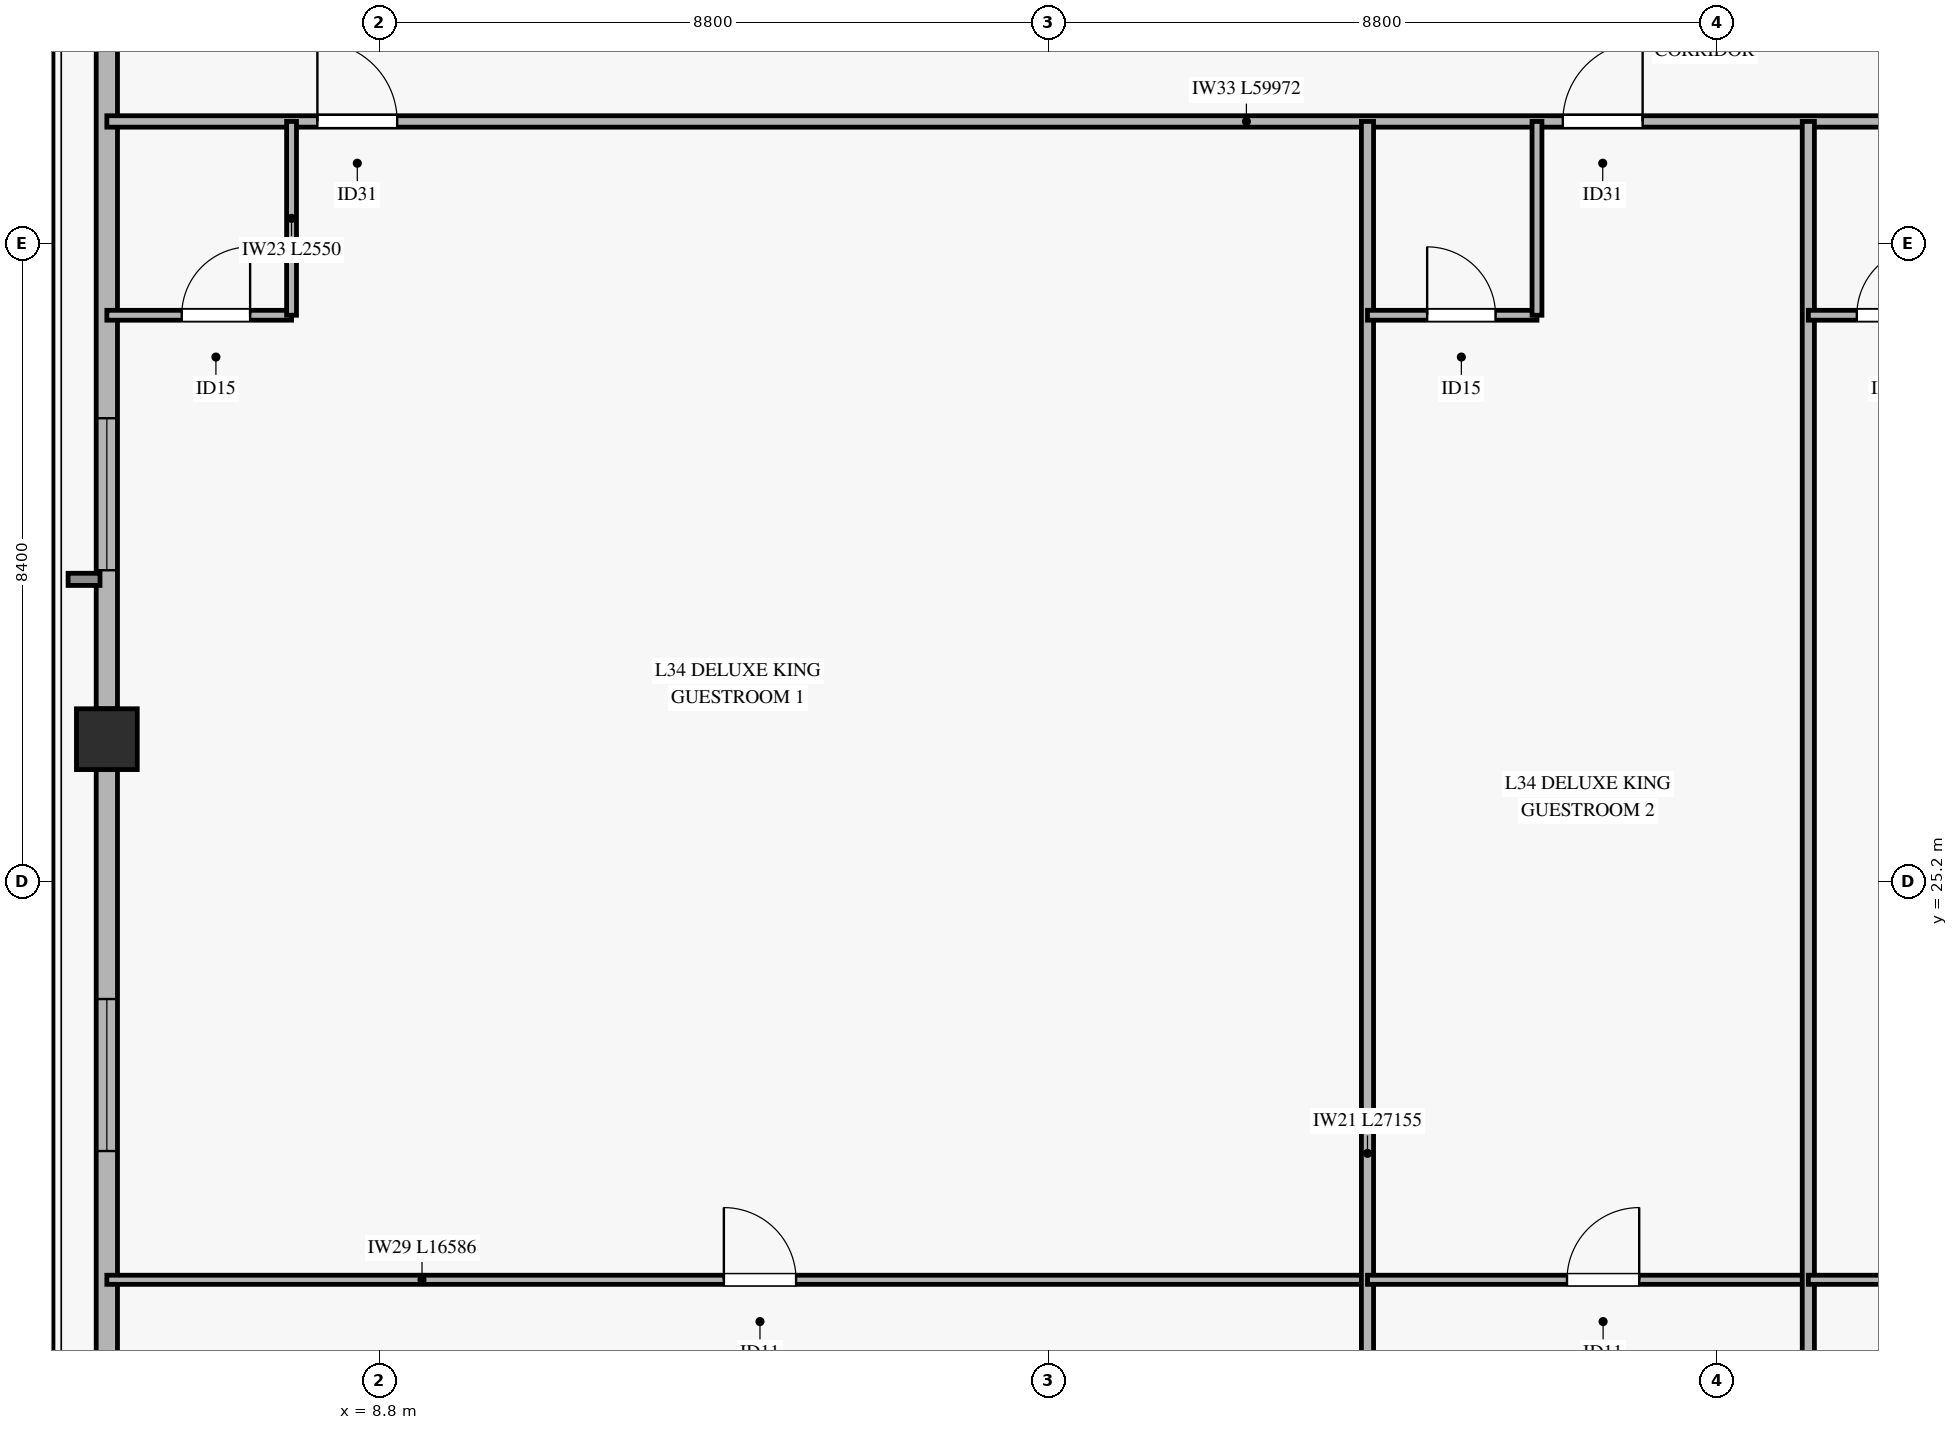
"""IFC4 building model, lengths in metres.
Left out: names, types, materials, properties, quantities, classifications, styles, units other than length and angle.
Written with IfcOpenShell. Run it as: python <this file> out.ifc"""

import sys

from ifc_helpers import new_model, si_unit, direction, frame, frame_2d, origin, origin_2d, place, context, subcontext, project, spatial, rectangle, hollow_rectangle, extrude, source, transform, mapped, element, fill, save


model = new_model("IFC4")
c1 = context("Model", 3, precision=1e-05, world=origin(), true_north=direction((0.0, 1.0)))
c2 = subcontext(c1, "Body", "Model", "MODEL_VIEW")
j1 = project(units=[si_unit("LENGTHUNIT", "METRE"), si_unit("PLANEANGLEUNIT", "RADIAN")], contexts=[c1])
p1 = place(None, origin())
s1 = spatial("IfcSite", under=j1, at=p1, CompositionType="ELEMENT")
p2 = place(p1, origin())
s2 = spatial("IfcBuilding", under=s1, at=p2, CompositionType="ELEMENT")
p3 = place(p2, frame((0.0, 0.0, 141.2)))
s3 = spatial("IfcBuildingStorey", under=s2, at=p3, CompositionType="ELEMENT", Elevation=141.2)
m1 = source(origin(), c2, "Body", "SweptSolid", [
    extrude(hollow_rectangle(XDim=0.8, YDim=0.8, WallThickness=0.036, at=origin_2d()), origin(), (0.0, 0.0, 1.0), 3.22),
])
p4 = place(p3, frame((5.214, 27.072, 0.0), z_axis=(0.0, 0.0, 1.0), x_axis=(1.0, 0.0, 0.0)))
e1 = element("IfcColumn", 1, at=p4, inside=s3, PredefinedType="COLUMN", context=c2, shape_type="MappedRepresentation", body=[
    mapped(m1, transform((0.0, 0.0, 0.0), x_axis=(1.0, 0.0, 0.0), y_axis=(0.0, 1.0, 0.0), z_axis=(0.0, 0.0, 1.0), scale=1.0)),
])
p5 = place(p3, frame((5.214, 11.01, 0.0), z_axis=(0.0, 0.0, 1.0), x_axis=(0.0, 1.0, 0.0)))
e2 = element("IfcWall", 2, at=p5, inside=s3, PredefinedType="SOLIDWALL", context=c2, shape_type="SweptSolid", body=[
    extrude(rectangle(XDim=15.662, YDim=0.28, at=frame_2d((7.831, 0.0))), origin(), (0.0, 0.0, 1.0), 2.7),
])
p6 = place(p5, frame((3.312, 0.0, 0.45)))
e3 = element("IfcOpeningElement", 3, at=p6, cuts=e2, PredefinedType="OPENING", context=c2, shape_type="SweptSolid", body=[
    extrude(rectangle(XDim=2.0, YDim=2.0, at=frame_2d((1.0, 1.0))), frame((0.0, 0.15, 0.0), z_axis=(0.0, -1.0, 0.0), x_axis=(1.0, 0.0, 0.0)), (0.0, 0.0, 1.0), 0.3),
])
p7 = place(p5, frame((10.643, 0.0, 0.45)))
e4 = element("IfcOpeningElement", 4, at=p7, cuts=e2, PredefinedType="OPENING", context=c2, shape_type="SweptSolid", body=[
    extrude(rectangle(XDim=2.0, YDim=2.0, at=frame_2d((1.0, 1.0))), frame((0.0, 0.15, 0.0), z_axis=(0.0, -1.0, 0.0), x_axis=(1.0, 0.0, 0.0)), (0.0, 0.0, 1.0), 0.3),
])
p8 = place(p3, frame((5.214, 27.472, 0.0), z_axis=(0.0, 0.0, 1.0), x_axis=(0.0, 1.0, 0.0)))
e5 = element("IfcWall", 5, at=p8, inside=s3, PredefinedType="SOLIDWALL", context=c2, shape_type="SweptSolid", body=[
    extrude(rectangle(XDim=15.662, YDim=0.28, at=frame_2d((7.831, 0.0))), origin(), (0.0, 0.0, 1.0), 2.7),
])
p9 = place(p8, frame((1.823, 0.0, 0.45)))
e6 = element("IfcOpeningElement", 6, at=p9, cuts=e5, PredefinedType="OPENING", context=c2, shape_type="SweptSolid", body=[
    extrude(rectangle(XDim=2.0, YDim=2.0, at=frame_2d((1.0, 1.0))), frame((0.0, 0.15, 0.0), z_axis=(0.0, -1.0, 0.0), x_axis=(1.0, 0.0, 0.0)), (0.0, 0.0, 1.0), 0.3),
])
p10 = place(p8, frame((12.458, 0.0, 0.45)))
e7 = element("IfcOpeningElement", 7, at=p10, cuts=e5, PredefinedType="OPENING", context=c2, shape_type="SweptSolid", body=[
    extrude(rectangle(XDim=2.0, YDim=2.0, at=frame_2d((1.0, 1.0))), frame((0.0, 0.15, 0.0), z_axis=(0.0, -1.0, 0.0), x_axis=(1.0, 0.0, 0.0)), (0.0, 0.0, 1.0), 0.3),
])
p11 = place(p3, frame((5.214, 35.2, 0.0), z_axis=(0.0, 0.0, 1.0), x_axis=(1.0, 0.0, 0.0)))
e8 = element("IfcWall", 8, at=p11, inside=s3, PredefinedType="PARTITIONING", context=c2, shape_type="SweptSolid", body=[
    extrude(rectangle(XDim=59.972, YDim=0.15, at=frame_2d((29.986, 0.0))), origin(), (0.0, 0.0, 1.0), 2.405),
])
p12 = place(p11, frame((2.77, 0.0, 0.0)))
e9 = element("IfcOpeningElement", 9, at=p12, cuts=e8, PredefinedType="OPENING", context=c2, shape_type="SweptSolid", body=[
    extrude(rectangle(XDim=1.05, YDim=2.15, at=frame_2d((0.525, 1.075))), frame((0.0, 0.085, 0.0), z_axis=(0.0, -1.0, 0.0), x_axis=(1.0, 0.0, 0.0)), (0.0, 0.0, 1.0), 0.17),
])
p13 = place(p11, frame((19.156, 0.0, 0.0)))
e10 = element("IfcOpeningElement", 10, at=p13, cuts=e8, PredefinedType="OPENING", context=c2, shape_type="SweptSolid", body=[
    extrude(rectangle(XDim=1.05, YDim=2.15, at=frame_2d((0.525, 1.075))), frame((0.0, 0.085, 0.0), z_axis=(0.0, -1.0, 0.0), x_axis=(1.0, 0.0, 0.0)), (0.0, 0.0, 1.0), 0.17),
])
p14 = place(p11, frame((24.662, 0.0, 0.0)))
e11 = element("IfcOpeningElement", 11, at=p14, cuts=e8, PredefinedType="OPENING", context=c2, shape_type="SweptSolid", body=[
    extrude(rectangle(XDim=1.05, YDim=2.15, at=frame_2d((0.525, 1.075))), frame((0.0, 0.085, 0.0), z_axis=(0.0, -1.0, 0.0), x_axis=(1.0, 0.0, 0.0)), (0.0, 0.0, 1.0), 0.17),
])
p15 = place(p11, frame((29.462, 0.0, 0.0)))
e12 = element("IfcOpeningElement", 12, at=p15, cuts=e8, PredefinedType="OPENING", context=c2, shape_type="SweptSolid", body=[
    extrude(rectangle(XDim=1.05, YDim=2.15, at=frame_2d((0.525, 1.075))), frame((0.0, 0.085, 0.0), z_axis=(0.0, -1.0, 0.0), x_axis=(1.0, 0.0, 0.0)), (0.0, 0.0, 1.0), 0.17),
])
p16 = place(p11, frame((34.262, 0.0, 0.0)))
e13 = element("IfcOpeningElement", 13, at=p16, cuts=e8, PredefinedType="OPENING", context=c2, shape_type="SweptSolid", body=[
    extrude(rectangle(XDim=1.05, YDim=2.15, at=frame_2d((0.525, 1.075))), frame((0.0, 0.085, 0.0), z_axis=(0.0, -1.0, 0.0), x_axis=(1.0, 0.0, 0.0)), (0.0, 0.0, 1.0), 0.17),
])
p17 = place(p11, frame((38.806, 0.0, 0.0)))
e14 = element("IfcOpeningElement", 14, at=p17, cuts=e8, PredefinedType="OPENING", context=c2, shape_type="SweptSolid", body=[
    extrude(rectangle(XDim=1.05, YDim=2.15, at=frame_2d((0.525, 1.075))), frame((0.0, 0.085, 0.0), z_axis=(0.0, -1.0, 0.0), x_axis=(1.0, 0.0, 0.0)), (0.0, 0.0, 1.0), 0.17),
])
p18 = place(p11, frame((42.956, 0.0, 0.0)))
e15 = element("IfcOpeningElement", 15, at=p18, cuts=e8, PredefinedType="OPENING", context=c2, shape_type="SweptSolid", body=[
    extrude(rectangle(XDim=1.05, YDim=2.15, at=frame_2d((0.525, 1.075))), frame((0.0, 0.085, 0.0), z_axis=(0.0, -1.0, 0.0), x_axis=(1.0, 0.0, 0.0)), (0.0, 0.0, 1.0), 0.17),
])
p19 = place(p3, frame((5.214, 32.65, 0.0), z_axis=(0.0, 0.0, 1.0), x_axis=(1.0, 0.0, 0.0)))
e16 = element("IfcWall", 16, at=p19, inside=s3, PredefinedType="PARTITIONING", context=c2, shape_type="SweptSolid", body=[
    extrude(rectangle(XDim=2.43, YDim=0.13, at=frame_2d((1.215, 0.0))), origin(), (0.0, 0.0, 1.0), 2.705),
])
p20 = place(p19, frame((0.985, 0.0, 0.0)))
e17 = element("IfcOpeningElement", 17, at=p20, cuts=e16, PredefinedType="OPENING", context=c2, shape_type="SweptSolid", body=[
    extrude(rectangle(XDim=0.9, YDim=2.1, at=frame_2d((0.45, 1.05))), frame((0.0, 0.075, 0.0), z_axis=(0.0, -1.0, 0.0), x_axis=(1.0, 0.0, 0.0)), (0.0, 0.0, 1.0), 0.15),
])
p21 = place(p3, frame((7.644, 32.65, 0.0), z_axis=(0.0, 0.0, 1.0), x_axis=(0.0, 1.0, 0.0)))
e18 = element("IfcWall", 18, at=p21, inside=s3, PredefinedType="PARTITIONING", context=c2, shape_type="SweptSolid", body=[
    extrude(rectangle(XDim=2.55, YDim=0.13, at=frame_2d((1.275, 0.0))), origin(), (0.0, 0.0, 1.0), 3.22),
])
p22 = place(p3, frame((5.214, 19.959, 0.0), z_axis=(0.0, 0.0, 1.0), x_axis=(1.0, 0.0, 0.0)))
e19 = element("IfcWall", 19, at=p22, inside=s3, PredefinedType="PARTITIONING", context=c2, shape_type="SweptSolid", body=[
    extrude(rectangle(XDim=16.586, YDim=0.12, at=frame_2d((8.293, 0.0))), origin(), (0.0, 0.0, 1.0), 2.405),
])
p23 = place(p22, frame((8.118, 0.0, 0.0)))
e20 = element("IfcOpeningElement", 20, at=p23, cuts=e19, PredefinedType="OPENING", context=c2, shape_type="SweptSolid", body=[
    extrude(rectangle(XDim=0.95, YDim=2.1, at=frame_2d((0.475, 1.05))), frame((0.0, 0.07, 0.0), z_axis=(0.0, -1.0, 0.0), x_axis=(1.0, 0.0, 0.0)), (0.0, 0.0, 1.0), 0.14),
])
p24 = place(p3, frame((21.8, 8.045, 0.0), z_axis=(0.0, 0.0, 1.0), x_axis=(0.0, 1.0, 0.0)))
e21 = element("IfcWall", 21, at=p24, inside=s3, PredefinedType="PARTITIONING", context=c2, shape_type="SweptSolid", body=[
    extrude(rectangle(XDim=27.155, YDim=0.16, at=frame_2d((13.578, 0.0))), origin(), (0.0, 0.0, 1.0), 2.705),
])
p25 = place(p3, frame((21.8, 32.65, 0.0), z_axis=(0.0, 0.0, 1.0), x_axis=(1.0, 0.0, 0.0)))
e22 = element("IfcWall", 22, at=p25, inside=s3, PredefinedType="PARTITIONING", context=c2, shape_type="SweptSolid", body=[
    extrude(rectangle(XDim=2.23, YDim=0.13, at=frame_2d((1.115, 0.0))), origin(), (0.0, 0.0, 1.0), 2.755),
])
p26 = place(p25, frame((0.785, 0.0, 0.0)))
e23 = element("IfcOpeningElement", 23, at=p26, cuts=e22, PredefinedType="OPENING", context=c2, shape_type="SweptSolid", body=[
    extrude(rectangle(XDim=0.9, YDim=2.1, at=frame_2d((0.45, 1.05))), frame((0.0, 0.075, 0.0), z_axis=(0.0, -1.0, 0.0), x_axis=(1.0, 0.0, 0.0)), (0.0, 0.0, 1.0), 0.15),
])
p27 = place(p3, frame((24.03, 32.65, 0.0), z_axis=(0.0, 0.0, 1.0), x_axis=(0.0, 1.0, 0.0)))
e24 = element("IfcWall", 24, at=p27, inside=s3, PredefinedType="PARTITIONING", context=c2, shape_type="SweptSolid", body=[
    extrude(rectangle(XDim=2.55, YDim=0.13, at=frame_2d((1.275, 0.0))), origin(), (0.0, 0.0, 1.0), 3.22),
])
p28 = place(p3, frame((21.8, 19.959, 0.0), z_axis=(0.0, 0.0, 1.0), x_axis=(1.0, 0.0, 0.0)))
e25 = element("IfcWall", 25, at=p28, inside=s3, PredefinedType="PARTITIONING", context=c2, shape_type="SweptSolid", body=[
    extrude(rectangle(XDim=5.8, YDim=0.12, at=frame_2d((2.9, 0.0))), origin(), (0.0, 0.0, 1.0), 3.22),
])
p29 = place(p28, frame((2.625, 0.0, 0.0)))
e26 = element("IfcOpeningElement", 26, at=p29, cuts=e25, PredefinedType="OPENING", context=c2, shape_type="SweptSolid", body=[
    extrude(rectangle(XDim=0.95, YDim=2.1, at=frame_2d((0.475, 1.05))), frame((0.0, 0.07, 0.0), z_axis=(0.0, -1.0, 0.0), x_axis=(1.0, 0.0, 0.0)), (0.0, 0.0, 1.0), 0.14),
])
p30 = place(p3, frame((27.6, 8.045, 0.0), z_axis=(0.0, 0.0, 1.0), x_axis=(0.0, 1.0, 0.0)))
e27 = element("IfcWall", 27, at=p30, inside=s3, PredefinedType="PARTITIONING", context=c2, shape_type="SweptSolid", body=[
    extrude(rectangle(XDim=27.155, YDim=0.16, at=frame_2d((13.578, 0.0))), origin(), (0.0, 0.0, 1.0), 2.705),
])
p31 = place(p3, frame((27.6, 32.65, 0.0), z_axis=(0.0, 0.0, 1.0), x_axis=(1.0, 0.0, 0.0)))
e28 = element("IfcWall", 28, at=p31, inside=s3, PredefinedType="PARTITIONING", context=c2, shape_type="SweptSolid", body=[
    extrude(rectangle(XDim=1.936, YDim=0.13, at=frame_2d((0.968, 0.0))), origin(), (0.0, 0.0, 1.0), 2.755),
])
p32 = place(p31, frame((0.638, 0.0, 0.0)))
e29 = element("IfcOpeningElement", 29, at=p32, cuts=e28, PredefinedType="OPENING", context=c2, shape_type="SweptSolid", body=[
    extrude(rectangle(XDim=0.9, YDim=2.1, at=frame_2d((0.45, 1.05))), frame((0.0, 0.075, 0.0), z_axis=(0.0, -1.0, 0.0), x_axis=(1.0, 0.0, 0.0)), (0.0, 0.0, 1.0), 0.15),
])
p33 = place(p3, frame((27.6, 19.959, 0.0), z_axis=(0.0, 0.0, 1.0), x_axis=(1.0, 0.0, 0.0)))
e30 = element("IfcWall", 30, at=p33, inside=s3, PredefinedType="PARTITIONING", context=c2, shape_type="SweptSolid", body=[
    extrude(rectangle(XDim=4.8, YDim=0.12, at=frame_2d((2.4, 0.0))), origin(), (0.0, 0.0, 1.0), 2.405),
])
p34 = place(p33, frame((2.125, 0.0, 0.0)))
e31 = element("IfcOpeningElement", 31, at=p34, cuts=e30, PredefinedType="OPENING", context=c2, shape_type="SweptSolid", body=[
    extrude(rectangle(XDim=0.95, YDim=2.1, at=frame_2d((0.475, 1.05))), frame((0.0, 0.07, 0.0), z_axis=(0.0, -1.0, 0.0), x_axis=(1.0, 0.0, 0.0)), (0.0, 0.0, 1.0), 0.14),
])
m2 = source(origin(), c2, "Body", "SweptSolid", [
    extrude(rectangle(XDim=2.0, YDim=2.0, at=frame_2d((1.0, 1.0))), frame((0.0, 0.03, 0.0), z_axis=(0.0, -1.0, 0.0), x_axis=(1.0, 0.0, 0.0)), (0.0, 0.0, 1.0), 0.06),
])
p35 = place(p7, origin())
e32 = element("IfcWindow", 32, at=p35, inside=s3, PartitioningType="SINGLE_PANEL", PredefinedType="WINDOW", context=c2, shape_type="MappedRepresentation", body=[
    mapped(m2, transform((0.0, 0.0, 0.0), x_axis=(1.0, 0.0, 0.0), y_axis=(0.0, 1.0, 0.0), z_axis=(0.0, 0.0, 1.0), scale=1.0)),
])
fill(e4, e32)
p36 = place(p9, origin())
e33 = element("IfcWindow", 33, at=p36, inside=s3, PartitioningType="SINGLE_PANEL", PredefinedType="WINDOW", context=c2, shape_type="MappedRepresentation", body=[
    mapped(m2, transform((0.0, 0.0, 0.0), x_axis=(1.0, 0.0, 0.0), y_axis=(0.0, 1.0, 0.0), z_axis=(0.0, 0.0, 1.0), scale=1.0)),
])
fill(e6, e33)
m3 = source(origin(), c2, "Body", "SweptSolid", [
    extrude(rectangle(XDim=1.05, YDim=2.15, at=frame_2d((0.525, 1.075))), frame((0.0, 0.025, 0.0), z_axis=(0.0, -1.0, 0.0), x_axis=(1.0, 0.0, 0.0)), (0.0, 0.0, 1.0), 0.05),
])
p37 = place(p12, origin())
e34 = element("IfcDoor", 34, at=p37, inside=s3, OperationType="SINGLE_SWING_LEFT", PredefinedType="DOOR", context=c2, shape_type="MappedRepresentation", body=[
    mapped(m3, transform((0.0, 0.0, 0.0), x_axis=(1.0, 0.0, 0.0), y_axis=(0.0, 1.0, 0.0), z_axis=(0.0, 0.0, 1.0), scale=1.0)),
])
fill(e9, e34)
m4 = source(origin(), c2, "Body", "SweptSolid", [
    extrude(rectangle(XDim=0.9, YDim=2.1, at=frame_2d((0.45, 1.05))), frame((0.0, 0.025, 0.0), z_axis=(0.0, -1.0, 0.0), x_axis=(1.0, 0.0, 0.0)), (0.0, 0.0, 1.0), 0.05),
])
p38 = place(p20, origin())
e35 = element("IfcDoor", 35, at=p38, inside=s3, OperationType="SINGLE_SWING_RIGHT", PredefinedType="DOOR", context=c2, shape_type="MappedRepresentation", body=[
    mapped(m4, transform((0.0, 0.0, 0.0), x_axis=(1.0, 0.0, 0.0), y_axis=(0.0, 1.0, 0.0), z_axis=(0.0, 0.0, 1.0), scale=1.0)),
])
fill(e17, e35)
m5 = source(origin(), c2, "Body", "SweptSolid", [
    extrude(rectangle(XDim=0.95, YDim=2.1, at=frame_2d((0.475, 1.05))), frame((0.0, 0.025, 0.0), z_axis=(0.0, -1.0, 0.0), x_axis=(1.0, 0.0, 0.0)), (0.0, 0.0, 1.0), 0.05),
])
p39 = place(p23, origin())
e36 = element("IfcDoor", 36, at=p39, inside=s3, OperationType="SINGLE_SWING_LEFT", PredefinedType="DOOR", context=c2, shape_type="MappedRepresentation", body=[
    mapped(m5, transform((0.0, 0.0, 0.0), x_axis=(1.0, 0.0, 0.0), y_axis=(0.0, 1.0, 0.0), z_axis=(0.0, 0.0, 1.0), scale=1.0)),
])
fill(e20, e36)
p40 = place(p13, origin())
e37 = element("IfcDoor", 37, at=p40, inside=s3, OperationType="SINGLE_SWING_RIGHT", PredefinedType="DOOR", context=c2, shape_type="MappedRepresentation", body=[
    mapped(m3, transform((0.0, 0.0, 0.0), x_axis=(1.0, 0.0, 0.0), y_axis=(0.0, 1.0, 0.0), z_axis=(0.0, 0.0, 1.0), scale=1.0)),
])
fill(e10, e37)
p41 = place(p26, origin())
e38 = element("IfcDoor", 38, at=p41, inside=s3, OperationType="SINGLE_SWING_LEFT", PredefinedType="DOOR", context=c2, shape_type="MappedRepresentation", body=[
    mapped(m4, transform((0.0, 0.0, 0.0), x_axis=(1.0, 0.0, 0.0), y_axis=(0.0, 1.0, 0.0), z_axis=(0.0, 0.0, 1.0), scale=1.0)),
])
fill(e23, e38)
p42 = place(p29, origin())
e39 = element("IfcDoor", 39, at=p42, inside=s3, OperationType="SINGLE_SWING_RIGHT", PredefinedType="DOOR", context=c2, shape_type="MappedRepresentation", body=[
    mapped(m5, transform((0.0, 0.0, 0.0), x_axis=(1.0, 0.0, 0.0), y_axis=(0.0, 1.0, 0.0), z_axis=(0.0, 0.0, 1.0), scale=1.0)),
])
fill(e26, e39)
p43 = place(p32, origin())
e40 = element("IfcDoor", 40, at=p43, inside=s3, OperationType="SINGLE_SWING_RIGHT", PredefinedType="DOOR", context=c2, shape_type="MappedRepresentation", body=[
    mapped(m4, transform((0.0, 0.0, 0.0), x_axis=(1.0, 0.0, 0.0), y_axis=(0.0, 1.0, 0.0), z_axis=(0.0, 0.0, 1.0), scale=1.0)),
])
fill(e29, e40)
save(model, sys.argv[1])
